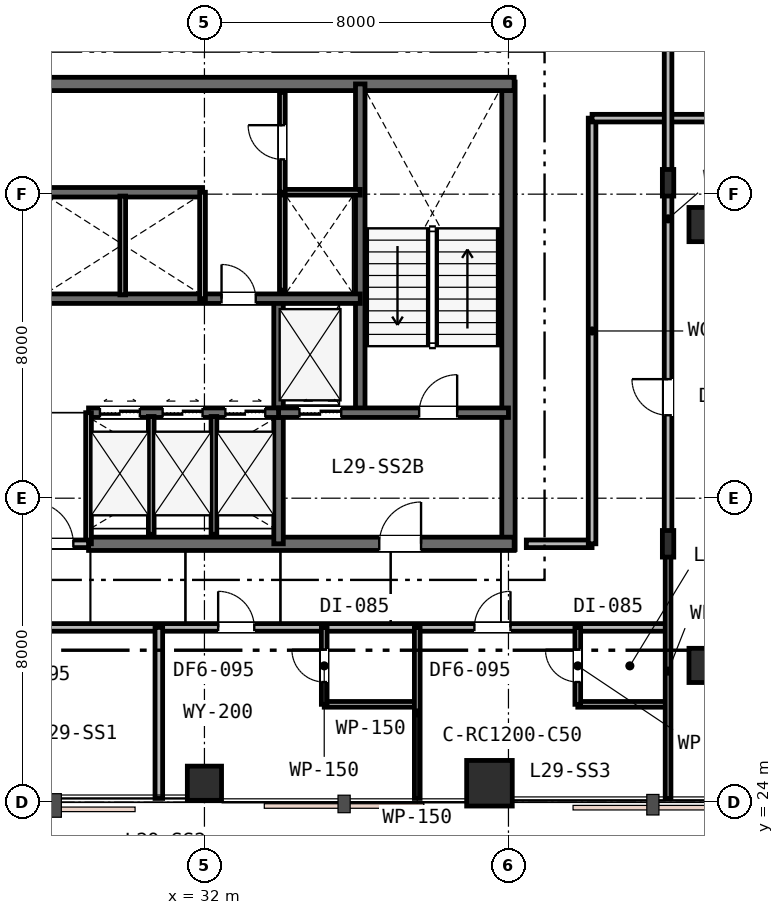
"""IFC4 building model, lengths in metres.
Left out: names, types, materials, properties, quantities, classifications, styles, units other than length and angle.
Written with IfcOpenShell. Run it as: python <this file> out.ifc"""

import sys

from ifc_helpers import new_model, si_unit, direction, frame, frame_2d, origin, origin_2d, place, context, subcontext, project, spatial, rectangle, i_section, extrude, element, fill, save


model = new_model("IFC4")
c1 = context("Model", 3, precision=1e-05, world=origin(), true_north=direction((0.0, 1.0)))
c2 = subcontext(c1, "Body", "Model", "MODEL_VIEW")
j1 = project(units=[si_unit("LENGTHUNIT", "METRE"), si_unit("PLANEANGLEUNIT", "RADIAN")], contexts=[c1])
p1 = place(None, origin())
s1 = spatial("IfcSite", under=j1, at=p1, CompositionType="ELEMENT")
p2 = place(p1, origin())
s2 = spatial("IfcBuilding", under=s1, at=p2, CompositionType="ELEMENT")
p3 = place(p2, frame((0.0, 0.0, 115.2)))
s3 = spatial("IfcBuildingStorey", under=s2, at=p3, CompositionType="ELEMENT", Elevation=115.2)
p4 = place(p3, frame((40.0, 30.65, 0.0), z_axis=(0.0, 0.0, 1.0), x_axis=(0.0, 1.0, 0.0)))
e1 = element("IfcWall", 1, at=p4, inside=s3, PredefinedType="SHEAR", context=c2, shape_type="SweptSolid", body=[
    extrude(rectangle(XDim=12.3, YDim=0.35, at=frame_2d((6.15, 0.0))), origin(), (0.0, 0.0, 1.0), 3.6),
])
p5 = place(p3, frame((15.85, 42.9, 0.0), z_axis=(0.0, 0.0, 1.0), x_axis=(1.0, 0.0, 0.0)))
e2 = element("IfcWall", 2, at=p5, inside=s3, PredefinedType="SHEAR", context=c2, shape_type="SweptSolid", body=[
    extrude(rectangle(XDim=24.3, YDim=0.35, at=frame_2d((12.15, 0.0))), origin(), (0.0, 0.0, 1.0), 3.6),
])
p6 = place(p3, frame((28.95, 30.8, 0.0), z_axis=(0.0, 0.0, 1.0), x_axis=(1.0, 0.0, 0.0)))
e3 = element("IfcWall", 3, at=p6, inside=s3, PredefinedType="SHEAR", context=c2, shape_type="SweptSolid", body=[
    extrude(rectangle(XDim=11.2, YDim=0.35, at=frame_2d((5.6, 0.0))), origin(), (0.0, 0.0, 1.0), 3.6),
])
p7 = place(p6, frame((7.65, 0.0, 0.0)))
e4 = element("IfcOpeningElement", 4, at=p7, cuts=e3, PredefinedType="OPENING", context=c2, shape_type="SweptSolid", body=[
    extrude(rectangle(XDim=1.1, YDim=2.15, at=frame_2d((0.55, 1.075))), frame((0.0, 0.185, 0.0), z_axis=(0.0, -1.0, 0.0), x_axis=(1.0, 0.0, 0.0)), (0.0, 0.0, 1.0), 0.37),
])
p8 = place(p3, frame((36.1, 34.25, 0.0), z_axis=(0.0, 0.0, 1.0), x_axis=(0.0, 1.0, 0.0)))
e5 = element("IfcWall", 5, at=p8, inside=s3, PredefinedType="SHEAR", context=c2, shape_type="SweptSolid", body=[
    extrude(rectangle(XDim=8.65, YDim=0.25, at=frame_2d((4.325, 0.0))), origin(), (0.0, 0.0, 1.0), 3.6),
])
p9 = place(p3, frame((33.95, 30.8, 0.0), z_axis=(0.0, 0.0, 1.0), x_axis=(0.0, 1.0, 0.0)))
e6 = element("IfcWall", 6, at=p9, inside=s3, PredefinedType="SHEAR", context=c2, shape_type="SweptSolid", body=[
    extrude(rectangle(XDim=6.45, YDim=0.25, at=frame_2d((3.225, 0.0))), origin(), (0.0, 0.0, 1.0), 3.6),
])
p10 = place(p3, frame((33.95, 34.25, 0.0), z_axis=(0.0, 0.0, 1.0), x_axis=(1.0, 0.0, 0.0)))
e7 = element("IfcWall", 7, at=p10, inside=s3, PredefinedType="SHEAR", context=c2, shape_type="SweptSolid", body=[
    extrude(rectangle(XDim=6.05, YDim=0.25, at=frame_2d((3.025, 0.0))), origin(), (0.0, 0.0, 1.0), 3.6),
])
p11 = place(p10, frame((3.7, 0.0, 0.0)))
e8 = element("IfcOpeningElement", 8, at=p11, cuts=e7, PredefinedType="OPENING", context=c2, shape_type="SweptSolid", body=[
    extrude(rectangle(XDim=1.0, YDim=2.15, at=frame_2d((0.5, 1.075))), frame((0.0, 0.135, 0.0), z_axis=(0.0, -1.0, 0.0), x_axis=(1.0, 0.0, 0.0)), (0.0, 0.0, 1.0), 0.27),
])
p12 = place(p10, frame((0.55, 0.0, 0.0)))
e9 = element("IfcOpeningElement", 9, at=p12, cuts=e7, PredefinedType="OPENING", context=c2, shape_type="SweptSolid", body=[
    extrude(rectangle(XDim=1.1, YDim=2.15, at=frame_2d((0.55, 1.075))), frame((0.0, 0.135, 0.0), z_axis=(0.0, -1.0, 0.0), x_axis=(1.0, 0.0, 0.0)), (0.0, 0.0, 1.0), 0.27),
])
p13 = place(p3, frame((28.95, 34.25, 0.0), z_axis=(0.0, 0.0, 1.0), x_axis=(1.0, 0.0, 0.0)))
e10 = element("IfcWall", 10, at=p13, inside=s3, PredefinedType="SHEAR", context=c2, shape_type="SweptSolid", body=[
    extrude(rectangle(XDim=5.0, YDim=0.25, at=frame_2d((2.5, 0.0))), origin(), (0.0, 0.0, 1.0), 3.6),
])
p14 = place(p13, frame((0.3, 0.0, 0.0)))
e11 = element("IfcOpeningElement", 11, at=p14, cuts=e10, PredefinedType="OPENING", context=c2, shape_type="SweptSolid", body=[
    extrude(rectangle(XDim=1.05, YDim=2.15, at=frame_2d((0.525, 1.075))), frame((0.0, 0.135, 0.0), z_axis=(0.0, -1.0, 0.0), x_axis=(1.0, 0.0, 0.0)), (0.0, 0.0, 1.0), 0.27),
])
p15 = place(p13, frame((1.95, 0.0, 0.0)))
e12 = element("IfcOpeningElement", 12, at=p15, cuts=e10, PredefinedType="OPENING", context=c2, shape_type="SweptSolid", body=[
    extrude(rectangle(XDim=1.05, YDim=2.15, at=frame_2d((0.525, 1.075))), frame((0.0, 0.135, 0.0), z_axis=(0.0, -1.0, 0.0), x_axis=(1.0, 0.0, 0.0)), (0.0, 0.0, 1.0), 0.27),
])
p16 = place(p13, frame((3.6, 0.0, 0.0)))
e13 = element("IfcOpeningElement", 13, at=p16, cuts=e10, PredefinedType="OPENING", context=c2, shape_type="SweptSolid", body=[
    extrude(rectangle(XDim=1.05, YDim=2.15, at=frame_2d((0.525, 1.075))), frame((0.0, 0.135, 0.0), z_axis=(0.0, -1.0, 0.0), x_axis=(1.0, 0.0, 0.0)), (0.0, 0.0, 1.0), 0.27),
])
p17 = place(p3, frame((19.9, 37.25, 0.0), z_axis=(0.0, 0.0, 1.0), x_axis=(1.0, 0.0, 0.0)))
e14 = element("IfcWall", 14, at=p17, inside=s3, PredefinedType="SHEAR", context=c2, shape_type="SweptSolid", body=[
    extrude(rectangle(XDim=16.2, YDim=0.25, at=frame_2d((8.1, 0.0))), origin(), (0.0, 0.0, 1.0), 3.6),
])
p18 = place(p17, frame((12.55, 0.0, 0.0)))
e15 = element("IfcOpeningElement", 15, at=p18, cuts=e14, PredefinedType="OPENING", context=c2, shape_type="SweptSolid", body=[
    extrude(rectangle(XDim=0.9, YDim=2.15, at=frame_2d((0.45, 1.075))), frame((0.0, 0.135, 0.0), z_axis=(0.0, -1.0, 0.0), x_axis=(1.0, 0.0, 0.0)), (0.0, 0.0, 1.0), 0.27),
])
p19 = place(p3, frame((19.9, 40.05, 0.0), z_axis=(0.0, 0.0, 1.0), x_axis=(1.0, 0.0, 0.0)))
e16 = element("IfcWall", 16, at=p19, inside=s3, PredefinedType="SHEAR", context=c2, shape_type="SweptSolid", body=[
    extrude(rectangle(XDim=12.05, YDim=0.25, at=frame_2d((6.025, 0.0))), origin(), (0.0, 0.0, 1.0), 3.6),
])
p20 = place(p3, frame((32.0, 24.5, 0.0), z_axis=(0.0, 0.0, 1.0), x_axis=(1.0, 0.0, 0.0)))
e17 = element("IfcColumn", 17, at=p20, inside=s3, PredefinedType="COLUMN", context=c2, shape_type="SweptSolid", body=[
    extrude(rectangle(XDim=0.9, YDim=0.9, at=origin_2d()), origin(), (0.0, 0.0, 1.0), 3.6),
])
p21 = place(p3, frame((39.5, 24.5, 0.0), z_axis=(0.0, 0.0, 1.0), x_axis=(1.0, 0.0, 0.0)))
e18 = element("IfcColumn", 18, at=p21, inside=s3, PredefinedType="COLUMN", context=c2, shape_type="SweptSolid", body=[
    extrude(rectangle(XDim=1.2, YDim=1.2, at=origin_2d()), origin(), (0.0, 0.0, 1.0), 3.6),
])
for number, where, z_axis, x_axis in (
    (19, (45.2, 27.6, 0.0), (0.0, 0.0, 1.0), (1.0, 0.0, 0.0)),
    (20, (45.2, 39.2, 0.0), (0.0, 0.0, 1.0), (1.0, 0.0, 0.0)),
):
    element("IfcColumn", number, at=place(p3, frame(where, z_axis=z_axis, x_axis=x_axis)), inside=s3, PredefinedType="COLUMN", context=c2, shape_type="SweptSolid", body=[
        extrude(rectangle(XDim=0.9, YDim=0.9, at=origin_2d()), origin(), (0.0, 0.0, 1.0), 3.6),
    ])
for number, where, z_axis, x_axis in (
    (21, (44.2, 30.8, 0.0), (0.0, 0.0, 1.0), (1.0, 0.0, 0.0)),
    (22, (44.2, 40.3, 0.0), (0.0, 0.0, 1.0), (1.0, 0.0, 0.0)),
):
    element("IfcColumn", number, at=place(p3, frame(where, z_axis=z_axis, x_axis=x_axis)), inside=s3, PredefinedType="COLUMN", context=c2, shape_type="SweptSolid", body=[
        extrude(i_section(OverallWidth=0.3, OverallDepth=0.7, WebThickness=0.017, FlangeThickness=0.032, FilletRadius=0.027, at=origin_2d()), origin(), (0.0, 0.0, 1.0), 3.6),
    ])
p22 = place(p3, frame((28.95, 30.8, 0.0), z_axis=(0.0, 0.0, 1.0), x_axis=(0.0, 1.0, 0.0)))
e23 = element("IfcWall", 23, at=p22, inside=s3, PredefinedType="PLUMBINGWALL", context=c2, shape_type="SweptSolid", body=[
    extrude(rectangle(XDim=3.45, YDim=0.15, at=frame_2d((1.725, 0.0))), origin(), (0.0, 0.0, 1.0), 3.33),
])
p23 = place(p3, frame((27.05, 30.8, 0.0), z_axis=(0.0, 0.0, 1.0), x_axis=(1.0, 0.0, 0.0)))
e24 = element("IfcWall", 24, at=p23, inside=s3, PredefinedType="PARTITIONING", context=c2, shape_type="SweptSolid", body=[
    extrude(rectangle(XDim=1.9, YDim=0.2, at=frame_2d((0.95, 0.0))), origin(), (0.0, 0.0, 1.0), 3.01),
])
p24 = place(p23, frame((0.4, 0.0, 0.0)))
e25 = element("IfcOpeningElement", 25, at=p24, cuts=e24, PredefinedType="OPENING", context=c2, shape_type="SweptSolid", body=[
    extrude(rectangle(XDim=1.1, YDim=2.15, at=frame_2d((0.55, 1.075))), frame((0.0, 0.11, 0.0), z_axis=(0.0, -1.0, 0.0), x_axis=(1.0, 0.0, 0.0)), (0.0, 0.0, 1.0), 0.22),
])
for number, where, z_axis, x_axis in (
    (26, (30.6, 31.05, 0.0), (0.0, 0.0, 1.0), (0.0, 1.0, 0.0)),
    (27, (32.25, 31.05, 0.0), (0.0, 0.0, 1.0), (0.0, 1.0, 0.0)),
):
    element("IfcWall", number, at=place(p3, frame(where, z_axis=z_axis, x_axis=x_axis)), inside=s3, PredefinedType="PLUMBINGWALL", context=c2, shape_type="SweptSolid", body=[
        extrude(rectangle(XDim=3.1, YDim=0.15, at=frame_2d((1.55, 0.0))), origin(), (0.0, 0.0, 1.0), 3.33),
    ])
p25 = place(p3, frame((31.95, 37.25, 0.0), z_axis=(0.0, 0.0, 1.0), x_axis=(0.0, 1.0, 0.0)))
e28 = element("IfcWall", 28, at=p25, inside=s3, PredefinedType="PLUMBINGWALL", context=c2, shape_type="SweptSolid", body=[
    extrude(rectangle(XDim=2.8, YDim=0.15, at=frame_2d((1.4, 0.0))), origin(), (0.0, 0.0, 1.0), 3.33),
])
p26 = place(p3, frame((29.85, 37.35, 0.0), z_axis=(0.0, 0.0, 1.0), x_axis=(0.0, 1.0, 0.0)))
e29 = element("IfcWall", 29, at=p26, inside=s3, PredefinedType="PLUMBINGWALL", context=c2, shape_type="SweptSolid", body=[
    extrude(rectangle(XDim=2.6, YDim=0.15, at=frame_2d((1.3, 0.0))), origin(), (0.0, 0.0, 1.0), 3.33),
])
p27 = place(p3, frame((34.05, 37.473, 0.0), z_axis=(0.0, 0.0, 1.0), x_axis=(0.0, 1.0, 0.0)))
e30 = element("IfcWall", 30, at=p27, inside=s3, PredefinedType="PLUMBINGWALL", context=c2, shape_type="SweptSolid", body=[
    extrude(rectangle(XDim=2.577, YDim=0.15, at=frame_2d((1.288, 0.0))), origin(), (0.0, 0.0, 1.0), 3.33),
])
p28 = place(p3, frame((34.05, 40.05, 0.0), z_axis=(0.0, 0.0, 1.0), x_axis=(1.0, 0.0, 0.0)))
e31 = element("IfcWall", 31, at=p28, inside=s3, PredefinedType="PARTITIONING", context=c2, shape_type="SweptSolid", body=[
    extrude(rectangle(XDim=2.05, YDim=0.15, at=frame_2d((1.025, 0.0))), origin(), (0.0, 0.0, 1.0), 3.33),
])
p29 = place(p3, frame((34.05, 40.05, 0.0), z_axis=(0.0, 0.0, 1.0), x_axis=(0.0, 1.0, 0.0)))
e32 = element("IfcWall", 32, at=p29, inside=s3, PredefinedType="PARTITIONING", context=c2, shape_type="SweptSolid", body=[
    extrude(rectangle(XDim=2.63, YDim=0.15, at=frame_2d((1.315, 0.0))), origin(), (0.0, 0.0, 1.0), 3.33),
])
p30 = place(p29, frame((0.865, 0.0, 0.0)))
e33 = element("IfcOpeningElement", 33, at=p30, cuts=e32, PredefinedType="OPENING", context=c2, shape_type="SweptSolid", body=[
    extrude(rectangle(XDim=0.9, YDim=2.15, at=frame_2d((0.45, 1.075))), frame((0.0, 0.085, 0.0), z_axis=(0.0, -1.0, 0.0), x_axis=(1.0, 0.0, 0.0)), (0.0, 0.0, 1.0), 0.17),
])
p31 = place(p3, frame((13.6, 28.6, 0.0), z_axis=(0.0, 0.0, 1.0), x_axis=(1.0, 0.0, 0.0)))
e34 = element("IfcWall", 34, at=p31, inside=s3, PredefinedType="PARTITIONING", context=c2, shape_type="SweptSolid", body=[
    extrude(rectangle(XDim=30.6, YDim=0.2, at=frame_2d((15.3, 0.0))), origin(), (0.0, 0.0, 1.0), 2.87),
])
p32 = place(p31, frame((13.325, 0.0, 0.0)))
e35 = element("IfcOpeningElement", 35, at=p32, cuts=e34, PredefinedType="OPENING", context=c2, shape_type="SweptSolid", body=[
    extrude(rectangle(XDim=0.95, YDim=2.15, at=frame_2d((0.475, 1.075))), frame((0.0, 0.11, 0.0), z_axis=(0.0, -1.0, 0.0), x_axis=(1.0, 0.0, 0.0)), (0.0, 0.0, 1.0), 0.22),
])
p33 = place(p31, frame((18.761, 0.0, 0.0)))
e36 = element("IfcOpeningElement", 36, at=p33, cuts=e34, PredefinedType="OPENING", context=c2, shape_type="SweptSolid", body=[
    extrude(rectangle(XDim=0.95, YDim=2.15, at=frame_2d((0.475, 1.075))), frame((0.0, 0.11, 0.0), z_axis=(0.0, -1.0, 0.0), x_axis=(1.0, 0.0, 0.0)), (0.0, 0.0, 1.0), 0.22),
])
p34 = place(p31, frame((25.503, 0.0, 0.0)))
e37 = element("IfcOpeningElement", 37, at=p34, cuts=e34, PredefinedType="OPENING", context=c2, shape_type="SweptSolid", body=[
    extrude(rectangle(XDim=0.95, YDim=2.15, at=frame_2d((0.475, 1.075))), frame((0.0, 0.11, 0.0), z_axis=(0.0, -1.0, 0.0), x_axis=(1.0, 0.0, 0.0)), (0.0, 0.0, 1.0), 0.22),
])
p35 = place(p3, frame((40.47, 30.8, 0.0), z_axis=(0.0, 0.0, 1.0), x_axis=(1.0, 0.0, 0.0)))
e38 = element("IfcWall", 38, at=p35, inside=s3, PredefinedType="PARTITIONING", context=c2, shape_type="SweptSolid", body=[
    extrude(rectangle(XDim=1.73, YDim=0.2, at=frame_2d((0.865, 0.0))), origin(), (0.0, 0.0, 1.0), 2.87),
])
p36 = place(p3, frame((42.2, 30.8, 0.0), z_axis=(0.0, 0.0, 1.0), x_axis=(0.0, 1.0, 0.0)))
e39 = element("IfcWall", 39, at=p36, inside=s3, PredefinedType="PARTITIONING", context=c2, shape_type="SweptSolid", body=[
    extrude(rectangle(XDim=11.2, YDim=0.2, at=frame_2d((5.6, 0.0))), origin(), (0.0, 0.0, 1.0), 2.87),
])
p37 = place(p3, frame((42.2, 42.0, 0.0), z_axis=(0.0, 0.0, 1.0), x_axis=(1.0, 0.0, 0.0)))
e40 = element("IfcWall", 40, at=p37, inside=s3, PredefinedType="PARTITIONING", context=c2, shape_type="SweptSolid", body=[
    extrude(rectangle(XDim=8.7, YDim=0.2, at=frame_2d((4.35, 0.0))), origin(), (0.0, 0.0, 1.0), 3.33),
])
p38 = place(p3, frame((30.8, 24.1, 0.0), z_axis=(0.0, 0.0, 1.0), x_axis=(0.0, 1.0, 0.0)))
e41 = element("IfcWall", 41, at=p38, inside=s3, PredefinedType="PARTITIONING", context=c2, shape_type="SweptSolid", body=[
    extrude(rectangle(XDim=4.5, YDim=0.2, at=frame_2d((2.25, 0.0))), origin(), (0.0, 0.0, 1.0), 2.96),
])
p39 = place(p3, frame((35.152, 26.576, 0.0), z_axis=(0.0, 0.0, 1.0), x_axis=(1.0, 0.0, 0.0)))
e42 = element("IfcWall", 42, at=p39, inside=s3, PredefinedType="PARTITIONING", context=c2, shape_type="SweptSolid", body=[
    extrude(rectangle(XDim=2.448, YDim=0.15, at=frame_2d((1.224, 0.0))), origin(), (0.0, 0.0, 1.0), 3.01),
])
p40 = place(p3, frame((35.152, 26.576, 0.0), z_axis=(0.0, 0.0, 1.0), x_axis=(0.0, 1.0, 0.0)))
e43 = element("IfcWall", 43, at=p40, inside=s3, PredefinedType="PARTITIONING", context=c2, shape_type="SweptSolid", body=[
    extrude(rectangle(XDim=2.024, YDim=0.15, at=frame_2d((1.012, 0.0))), origin(), (0.0, 0.0, 1.0), 3.33),
])
p41 = place(p40, frame((0.587, 0.0, 0.0)))
e44 = element("IfcOpeningElement", 44, at=p41, cuts=e43, PredefinedType="OPENING", context=c2, shape_type="SweptSolid", body=[
    extrude(rectangle(XDim=0.85, YDim=2.15, at=frame_2d((0.425, 1.075))), frame((0.0, 0.085, 0.0), z_axis=(0.0, -1.0, 0.0), x_axis=(1.0, 0.0, 0.0)), (0.0, 0.0, 1.0), 0.17),
])
p42 = place(p3, frame((37.6, 28.6, 0.0), z_axis=(0.0, 0.0, 1.0), x_axis=(0.0, -1.0, 0.0)))
e45 = element("IfcWall", 45, at=p42, inside=s3, PredefinedType="PARTITIONING", context=c2, shape_type="SweptSolid", body=[
    extrude(rectangle(XDim=4.5, YDim=0.15, at=frame_2d((2.25, 0.0))), origin(), (0.0, 0.0, 1.0), 2.96),
])
p43 = place(p3, frame((41.824, 26.576, 0.0), z_axis=(0.0, 0.0, 1.0), x_axis=(1.0, 0.0, 0.0)))
e46 = element("IfcWall", 46, at=p43, inside=s3, PredefinedType="PARTITIONING", context=c2, shape_type="SweptSolid", body=[
    extrude(rectangle(XDim=2.376, YDim=0.15, at=frame_2d((1.188, 0.0))), origin(), (0.0, 0.0, 1.0), 3.33),
])
p44 = place(p3, frame((41.824, 26.576, 0.0), z_axis=(0.0, 0.0, 1.0), x_axis=(0.0, 1.0, 0.0)))
e47 = element("IfcWall", 47, at=p44, inside=s3, PredefinedType="PARTITIONING", context=c2, shape_type="SweptSolid", body=[
    extrude(rectangle(XDim=2.024, YDim=0.15, at=frame_2d((1.012, 0.0))), origin(), (0.0, 0.0, 1.0), 3.33),
])
p45 = place(p44, frame((0.587, 0.0, 0.0)))
e48 = element("IfcOpeningElement", 48, at=p45, cuts=e47, PredefinedType="OPENING", context=c2, shape_type="SweptSolid", body=[
    extrude(rectangle(XDim=0.85, YDim=2.15, at=frame_2d((0.425, 1.075))), frame((0.0, 0.085, 0.0), z_axis=(0.0, -1.0, 0.0), x_axis=(1.0, 0.0, 0.0)), (0.0, 0.0, 1.0), 0.17),
])
p46 = place(p3, frame((44.2, 30.8, 0.0), z_axis=(0.0, 0.0, 1.0), x_axis=(0.0, -1.0, 0.0)))
e49 = element("IfcWall", 49, at=p46, inside=s3, PredefinedType="PARTITIONING", context=c2, shape_type="SweptSolid", body=[
    extrude(rectangle(XDim=6.7, YDim=0.15, at=frame_2d((3.35, 0.0))), origin(), (0.0, 0.0, 1.0), 2.87),
])
p47 = place(p3, frame((44.2, 30.8, 0.0), z_axis=(0.0, 0.0, 1.0), x_axis=(0.0, 1.0, 0.0)))
e50 = element("IfcWall", 50, at=p47, inside=s3, PredefinedType="PARTITIONING", context=c2, shape_type="SweptSolid", body=[
    extrude(rectangle(XDim=17.1, YDim=0.2, at=frame_2d((8.55, 0.0))), origin(), (0.0, 0.0, 1.0), 2.87),
])
p48 = place(p47, frame((3.382, 0.0, 0.0)))
e51 = element("IfcOpeningElement", 51, at=p48, cuts=e50, PredefinedType="OPENING", context=c2, shape_type="SweptSolid", body=[
    extrude(rectangle(XDim=0.95, YDim=2.15, at=frame_2d((0.475, 1.075))), frame((0.0, 0.11, 0.0), z_axis=(0.0, -1.0, 0.0), x_axis=(1.0, 0.0, 0.0)), (0.0, 0.0, 1.0), 0.22),
])
p49 = place(p24, origin())
e52 = element("IfcDoor", 52, at=p49, inside=s3, OperationType="SINGLE_SWING_LEFT", PredefinedType="DOOR", context=c2, shape_type="SweptSolid", body=[
    extrude(rectangle(XDim=1.1, YDim=2.15, at=frame_2d((0.55, 1.075))), frame((0.0, 0.025, 0.0), z_axis=(0.0, -1.0, 0.0), x_axis=(1.0, 0.0, 0.0)), (0.0, 0.0, 1.0), 0.05),
])
fill(e25, e52)
p50 = place(p11, origin())
e53 = element("IfcDoor", 53, at=p50, inside=s3, OperationType="SINGLE_SWING_RIGHT", PredefinedType="DOOR", context=c2, shape_type="SweptSolid", body=[
    extrude(rectangle(XDim=1.0, YDim=2.15, at=frame_2d((0.5, 1.075))), frame((0.0, 0.025, 0.0), z_axis=(0.0, -1.0, 0.0), x_axis=(1.0, 0.0, 0.0)), (0.0, 0.0, 1.0), 0.05),
])
fill(e8, e53)
p51 = place(p7, origin())
e54 = element("IfcDoor", 54, at=p51, inside=s3, OperationType="SINGLE_SWING_RIGHT", PredefinedType="DOOR", context=c2, shape_type="SweptSolid", body=[
    extrude(rectangle(XDim=1.1, YDim=2.15, at=frame_2d((0.55, 1.075))), frame((0.0, 0.025, 0.0), z_axis=(0.0, -1.0, 0.0), x_axis=(1.0, 0.0, 0.0)), (0.0, 0.0, 1.0), 0.05),
])
fill(e4, e54)
p52 = place(p18, origin())
e55 = element("IfcDoor", 55, at=p52, inside=s3, OperationType="SINGLE_SWING_LEFT", PredefinedType="DOOR", context=c2, shape_type="SweptSolid", body=[
    extrude(rectangle(XDim=0.9, YDim=2.15, at=frame_2d((0.45, 1.075))), frame((0.0, 0.025, 0.0), z_axis=(0.0, -1.0, 0.0), x_axis=(1.0, 0.0, 0.0)), (0.0, 0.0, 1.0), 0.05),
])
fill(e15, e55)
p53 = place(p30, origin())
e56 = element("IfcDoor", 56, at=p53, inside=s3, OperationType="SINGLE_SWING_RIGHT", PredefinedType="DOOR", context=c2, shape_type="SweptSolid", body=[
    extrude(rectangle(XDim=0.9, YDim=2.15, at=frame_2d((0.45, 1.075))), frame((0.0, 0.025, 0.0), z_axis=(0.0, -1.0, 0.0), x_axis=(1.0, 0.0, 0.0)), (0.0, 0.0, 1.0), 0.05),
])
fill(e33, e56)
p54 = place(p33, origin())
e57 = element("IfcDoor", 57, at=p54, inside=s3, OperationType="SINGLE_SWING_LEFT", PredefinedType="DOOR", context=c2, shape_type="SweptSolid", body=[
    extrude(rectangle(XDim=0.95, YDim=2.15, at=frame_2d((0.475, 1.075))), frame((0.0, 0.025, 0.0), z_axis=(0.0, -1.0, 0.0), x_axis=(1.0, 0.0, 0.0)), (0.0, 0.0, 1.0), 0.05),
])
fill(e36, e57)
p55 = place(p41, origin())
e58 = element("IfcDoor", 58, at=p55, inside=s3, OperationType="SINGLE_SWING_RIGHT", PredefinedType="DOOR", context=c2, shape_type="SweptSolid", body=[
    extrude(rectangle(XDim=0.85, YDim=2.15, at=frame_2d((0.425, 1.075))), frame((0.0, 0.025, 0.0), z_axis=(0.0, -1.0, 0.0), x_axis=(1.0, 0.0, 0.0)), (0.0, 0.0, 1.0), 0.05),
])
fill(e44, e58)
p56 = place(p34, origin())
e59 = element("IfcDoor", 59, at=p56, inside=s3, OperationType="SINGLE_SWING_RIGHT", PredefinedType="DOOR", context=c2, shape_type="SweptSolid", body=[
    extrude(rectangle(XDim=0.95, YDim=2.15, at=frame_2d((0.475, 1.075))), frame((0.0, 0.025, 0.0), z_axis=(0.0, -1.0, 0.0), x_axis=(1.0, 0.0, 0.0)), (0.0, 0.0, 1.0), 0.05),
])
fill(e37, e59)
p57 = place(p45, origin())
e60 = element("IfcDoor", 60, at=p57, inside=s3, OperationType="SINGLE_SWING_RIGHT", PredefinedType="DOOR", context=c2, shape_type="SweptSolid", body=[
    extrude(rectangle(XDim=0.85, YDim=2.15, at=frame_2d((0.425, 1.075))), frame((0.0, 0.025, 0.0), z_axis=(0.0, -1.0, 0.0), x_axis=(1.0, 0.0, 0.0)), (0.0, 0.0, 1.0), 0.05),
])
fill(e48, e60)
p58 = place(p48, origin())
e61 = element("IfcDoor", 61, at=p58, inside=s3, OperationType="SINGLE_SWING_RIGHT", PredefinedType="DOOR", context=c2, shape_type="SweptSolid", body=[
    extrude(rectangle(XDim=0.95, YDim=2.15, at=frame_2d((0.475, 1.075))), frame((0.0, 0.025, 0.0), z_axis=(0.0, -1.0, 0.0), x_axis=(1.0, 0.0, 0.0)), (0.0, 0.0, 1.0), 0.05),
])
fill(e51, e61)
p59 = place(p12, origin())
e62 = element("IfcDoor", 62, at=p59, inside=s3, OperationType="DOUBLE_DOOR_SLIDING", PredefinedType="DOOR", context=c2, shape_type="SweptSolid", body=[
    extrude(rectangle(XDim=1.1, YDim=2.15, at=frame_2d((0.55, 1.075))), frame((0.0, 0.025, 0.0), z_axis=(0.0, -1.0, 0.0), x_axis=(1.0, 0.0, 0.0)), (0.0, 0.0, 1.0), 0.05),
])
fill(e9, e62)
p60 = place(p14, origin())
e63 = element("IfcDoor", 63, at=p60, inside=s3, OperationType="DOUBLE_DOOR_SLIDING", PredefinedType="DOOR", context=c2, shape_type="SweptSolid", body=[
    extrude(rectangle(XDim=1.05, YDim=2.15, at=frame_2d((0.525, 1.075))), frame((0.0, 0.025, 0.0), z_axis=(0.0, -1.0, 0.0), x_axis=(1.0, 0.0, 0.0)), (0.0, 0.0, 1.0), 0.05),
])
fill(e11, e63)
p61 = place(p15, origin())
e64 = element("IfcDoor", 64, at=p61, inside=s3, OperationType="DOUBLE_DOOR_SLIDING", PredefinedType="DOOR", context=c2, shape_type="SweptSolid", body=[
    extrude(rectangle(XDim=1.05, YDim=2.15, at=frame_2d((0.525, 1.075))), frame((0.0, 0.025, 0.0), z_axis=(0.0, -1.0, 0.0), x_axis=(1.0, 0.0, 0.0)), (0.0, 0.0, 1.0), 0.05),
])
fill(e12, e64)
p62 = place(p16, origin())
e65 = element("IfcDoor", 65, at=p62, inside=s3, OperationType="DOUBLE_DOOR_SLIDING", PredefinedType="DOOR", context=c2, shape_type="SweptSolid", body=[
    extrude(rectangle(XDim=1.05, YDim=2.15, at=frame_2d((0.525, 1.075))), frame((0.0, 0.025, 0.0), z_axis=(0.0, -1.0, 0.0), x_axis=(1.0, 0.0, 0.0)), (0.0, 0.0, 1.0), 0.05),
])
fill(e13, e65)
save(model, sys.argv[1])
